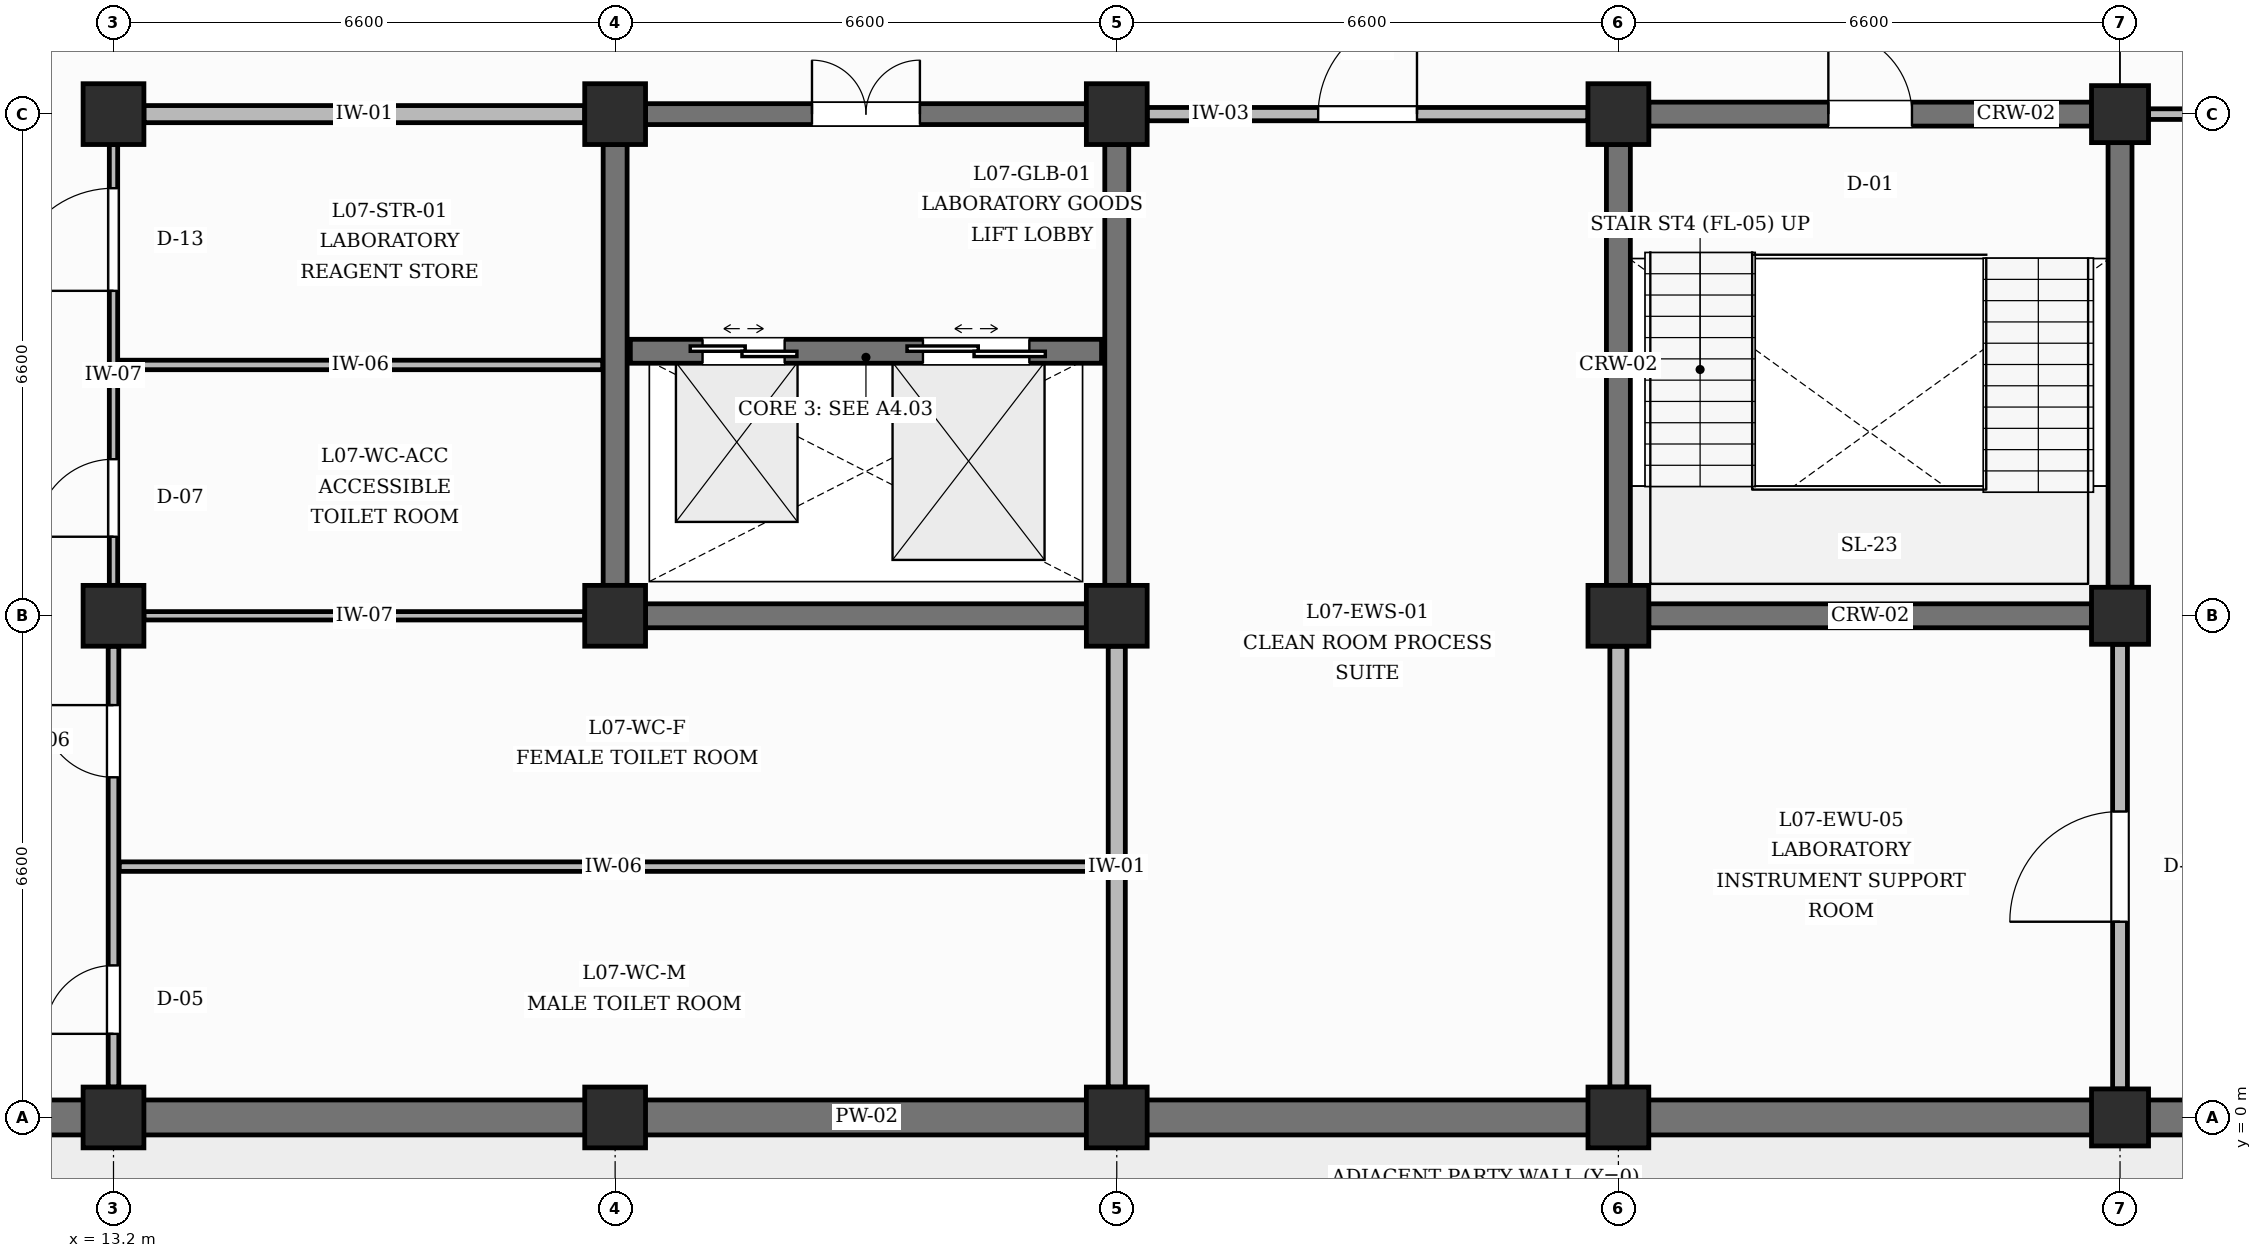
"""IFC4 building model, lengths in metres.
Left out: names, types, materials, properties, quantities, classifications, styles, units other than length and angle.
Written with IfcOpenShell. Run it as: python <this file> out.ifc"""

import sys

from ifc_helpers import new_model, si_unit, direction, frame, frame_2d, origin, origin_2d, place, context, subcontext, project, spatial, rectangle, extrude, element, fill, save


model = new_model("IFC4")
c1 = context("Model", 3, precision=1e-05, world=origin(), true_north=direction((0.0, 1.0)))
c2 = subcontext(c1, "Body", "Model", "MODEL_VIEW")
j1 = project(units=[si_unit("LENGTHUNIT", "METRE"), si_unit("PLANEANGLEUNIT", "RADIAN")], contexts=[c1])
p1 = place(None, origin())
s1 = spatial("IfcSite", under=j1, at=p1, CompositionType="ELEMENT")
p2 = place(p1, origin())
s2 = spatial("IfcBuilding", under=s1, at=p2, CompositionType="ELEMENT")
p3 = place(p2, frame((0.0, 0.0, 31.2)))
s3 = spatial("IfcBuildingStorey", under=s2, at=p3, CompositionType="ELEMENT", Elevation=31.2)
for number, where, z_axis, x_axis in (
    (1, (13.2, 0.0, 0.0), (0.0, 0.0, 1.0), (1.0, 0.0, 0.0)),
    (2, (13.2, 6.6, 0.0), (0.0, 0.0, 1.0), (1.0, 0.0, 0.0)),
    (3, (13.2, 13.2, 0.0), (0.0, 0.0, 1.0), (1.0, 0.0, 0.0)),
    (4, (19.8, 0.0, 0.0), (0.0, 0.0, 1.0), (1.0, 0.0, 0.0)),
    (5, (19.8, 6.6, 0.0), (0.0, 0.0, 1.0), (1.0, 0.0, 0.0)),
    (6, (19.8, 13.2, 0.0), (0.0, 0.0, 1.0), (1.0, 0.0, 0.0)),
    (7, (26.4, 0.0, 0.0), (0.0, 0.0, 1.0), (1.0, 0.0, 0.0)),
    (8, (26.4, 6.6, 0.0), (0.0, 0.0, 1.0), (1.0, 0.0, 0.0)),
    (9, (26.4, 13.2, 0.0), (0.0, 0.0, 1.0), (1.0, 0.0, 0.0)),
    (10, (33.0, 0.0, 0.0), (0.0, 0.0, 1.0), (1.0, 0.0, 0.0)),
    (11, (33.0, 6.6, 0.0), (0.0, 0.0, 1.0), (1.0, 0.0, 0.0)),
    (12, (33.0, 13.2, 0.0), (0.0, 0.0, 1.0), (1.0, 0.0, 0.0)),
):
    element("IfcColumn", number, at=place(p3, frame(where, z_axis=z_axis, x_axis=x_axis)), inside=s3, PredefinedType="COLUMN", context=c2, shape_type="SweptSolid", body=[
        extrude(rectangle(XDim=0.8, YDim=0.8, at=origin_2d()), origin(), (0.0, 0.0, 1.0), 4.2),
    ])
for number, where, z_axis, x_axis in (
    (13, (39.6, 0.0, 0.0), (0.0, 0.0, 1.0), (1.0, 0.0, 0.0)),
    (14, (39.6, 6.6, 0.0), (0.0, 0.0, 1.0), (1.0, 0.0, 0.0)),
    (15, (39.6, 13.2, 0.0), (0.0, 0.0, 1.0), (1.0, 0.0, 0.0)),
):
    element("IfcColumn", number, at=place(p3, frame(where, z_axis=z_axis, x_axis=x_axis)), inside=s3, PredefinedType="COLUMN", context=c2, shape_type="SweptSolid", body=[
        extrude(rectangle(XDim=0.75, YDim=0.75, at=origin_2d()), origin(), (0.0, 0.0, 1.0), 4.2),
    ])
p4 = place(p3, frame((7.0, 0.0, 0.0), z_axis=(0.0, 0.0, 1.0), x_axis=(1.0, 0.0, 0.0)))
e16 = element("IfcWall", 16, at=p4, inside=s3, PredefinedType="SOLIDWALL", context=c2, shape_type="SweptSolid", body=[
    extrude(rectangle(XDim=5.8, YDim=0.46, at=frame_2d((2.9, 0.0))), origin(), (0.0, 0.0, 1.0), 3.28),
])
p5 = place(p3, frame((13.6, 0.0, 0.0), z_axis=(0.0, 0.0, 1.0), x_axis=(1.0, 0.0, 0.0)))
e17 = element("IfcWall", 17, at=p5, inside=s3, PredefinedType="SOLIDWALL", context=c2, shape_type="SweptSolid", body=[
    extrude(rectangle(XDim=5.8, YDim=0.46, at=frame_2d((2.9, 0.0))), origin(), (0.0, 0.0, 1.0), 3.28),
])
for number, where, z_axis, x_axis in (
    (18, (20.2, 0.0, 0.0), (0.0, 0.0, 1.0), (1.0, 0.0, 0.0)),
    (19, (26.8, 0.0, 0.0), (0.0, 0.0, 1.0), (1.0, 0.0, 0.0)),
):
    element("IfcWall", number, at=place(p3, frame(where, z_axis=z_axis, x_axis=x_axis)), inside=s3, PredefinedType="SOLIDWALL", context=c2, shape_type="SweptSolid", body=[
        extrude(rectangle(XDim=5.8, YDim=0.46, at=frame_2d((2.9, 0.0))), origin(), (0.0, 0.0, 1.0), 3.28),
    ])
p6 = place(p3, frame((33.4, 0.0, 0.0), z_axis=(0.0, 0.0, 1.0), x_axis=(1.0, 0.0, 0.0)))
e20 = element("IfcWall", 20, at=p6, inside=s3, PredefinedType="SOLIDWALL", context=c2, shape_type="SweptSolid", body=[
    extrude(rectangle(XDim=5.825, YDim=0.46, at=frame_2d((2.913, 0.0))), origin(), (0.0, 0.0, 1.0), 3.28),
])
p7 = place(p3, frame((39.975, 0.0, 0.0), z_axis=(0.0, 0.0, 1.0), x_axis=(1.0, 0.0, 0.0)))
e21 = element("IfcWall", 21, at=p7, inside=s3, PredefinedType="SOLIDWALL", context=c2, shape_type="SweptSolid", body=[
    extrude(rectangle(XDim=5.85, YDim=0.46, at=frame_2d((2.925, 0.0))), origin(), (0.0, 0.0, 1.0), 3.28),
])
p8 = place(p3, frame((33.4, 6.6, 0.0), z_axis=(0.0, 0.0, 1.0), x_axis=(1.0, 0.0, 0.0)))
e22 = element("IfcWall", 22, at=p8, inside=s3, PredefinedType="SHEAR", context=c2, shape_type="SweptSolid", body=[
    extrude(rectangle(XDim=5.825, YDim=0.315, at=frame_2d((2.913, 0.0))), origin(), (0.0, 0.0, 1.0), 3.18),
])
p9 = place(p3, frame((33.4, 13.2, 0.0), z_axis=(0.0, 0.0, 1.0), x_axis=(1.0, 0.0, 0.0)))
e23 = element("IfcWall", 23, at=p9, inside=s3, PredefinedType="SHEAR", context=c2, shape_type="SweptSolid", body=[
    extrude(rectangle(XDim=5.825, YDim=0.315, at=frame_2d((2.913, 0.0))), origin(), (0.0, 0.0, 1.0), 3.18),
])
p10 = place(p9, frame((2.363, 0.0, 0.0)))
e24 = element("IfcOpeningElement", 24, at=p10, cuts=e23, PredefinedType="OPENING", context=c2, shape_type="SweptSolid", body=[
    extrude(rectangle(XDim=1.1, YDim=2.15, at=frame_2d((0.55, 1.075))), frame((0.0, 0.167, 0.0), z_axis=(0.0, -1.0, 0.0), x_axis=(1.0, 0.0, 0.0)), (0.0, 0.0, 1.0), 0.335),
])
p11 = place(p3, frame((33.0, 7.0, 0.0), z_axis=(0.0, 0.0, 1.0), x_axis=(0.0, 1.0, 0.0)))
e25 = element("IfcWall", 25, at=p11, inside=s3, PredefinedType="SHEAR", context=c2, shape_type="SweptSolid", body=[
    extrude(rectangle(XDim=5.8, YDim=0.315, at=frame_2d((2.9, 0.0))), origin(), (0.0, 0.0, 1.0), 3.18),
])
p12 = place(p3, frame((39.6, 6.975, 0.0), z_axis=(0.0, 0.0, 1.0), x_axis=(0.0, 1.0, 0.0)))
e26 = element("IfcWall", 26, at=p12, inside=s3, PredefinedType="SHEAR", context=c2, shape_type="SweptSolid", body=[
    extrude(rectangle(XDim=5.85, YDim=0.315, at=frame_2d((2.925, 0.0))), origin(), (0.0, 0.0, 1.0), 3.18),
])
for number, where, z_axis, x_axis in (
    (27, (20.2, 6.6, 0.0), (0.0, 0.0, 1.0), (1.0, 0.0, 0.0)),
    (28, (19.8, 7.0, 0.0), (0.0, 0.0, 1.0), (0.0, 1.0, 0.0)),
    (29, (26.4, 7.0, 0.0), (0.0, 0.0, 1.0), (0.0, 1.0, 0.0)),
):
    element("IfcWall", number, at=place(p3, frame(where, z_axis=z_axis, x_axis=x_axis)), inside=s3, PredefinedType="SHEAR", context=c2, shape_type="SweptSolid", body=[
        extrude(rectangle(XDim=5.8, YDim=0.315, at=frame_2d((2.9, 0.0))), origin(), (0.0, 0.0, 1.0), 3.18),
    ])
p13 = place(p3, frame((20.2, 13.2, 0.0), z_axis=(0.0, 0.0, 1.0), x_axis=(1.0, 0.0, 0.0)))
e30 = element("IfcWall", 30, at=p13, inside=s3, PredefinedType="SHEAR", context=c2, shape_type="SweptSolid", body=[
    extrude(rectangle(XDim=5.8, YDim=0.275, at=frame_2d((2.9, 0.0))), origin(), (0.0, 0.0, 1.0), 3.18),
])
p14 = place(p13, frame((2.19, 0.0, 0.0)))
e31 = element("IfcOpeningElement", 31, at=p14, cuts=e30, PredefinedType="OPENING", context=c2, shape_type="SweptSolid", body=[
    extrude(rectangle(XDim=1.42, YDim=2.2, at=frame_2d((0.71, 1.1))), frame((0.0, 0.147, 0.0), z_axis=(0.0, -1.0, 0.0), x_axis=(1.0, 0.0, 0.0)), (0.0, 0.0, 1.0), 0.295),
])
p15 = place(p3, frame((20.0, 10.08, 0.0), z_axis=(0.0, 0.0, 1.0), x_axis=(1.0, 0.0, 0.0)))
e32 = element("IfcWall", 32, at=p15, inside=s3, PredefinedType="SHEAR", context=c2, shape_type="SweptSolid", body=[
    extrude(rectangle(XDim=6.2, YDim=0.315, at=frame_2d((3.1, 0.0))), origin(), (0.0, 0.0, 1.0), 3.88),
])
p16 = place(p15, frame((0.95, 0.0, 0.0)))
e33 = element("IfcOpeningElement", 33, at=p16, cuts=e32, PredefinedType="OPENING", context=c2, shape_type="SweptSolid", body=[
    extrude(rectangle(XDim=1.08, YDim=2.15, at=frame_2d((0.54, 1.075))), frame((0.0, 0.167, 0.0), z_axis=(0.0, -1.0, 0.0), x_axis=(1.0, 0.0, 0.0)), (0.0, 0.0, 1.0), 0.335),
])
p17 = place(p15, frame((3.85, 0.0, 0.0)))
e34 = element("IfcOpeningElement", 34, at=p17, cuts=e32, PredefinedType="OPENING", context=c2, shape_type="SweptSolid", body=[
    extrude(rectangle(XDim=1.4, YDim=2.35, at=frame_2d((0.7, 1.175))), frame((0.0, 0.167, 0.0), z_axis=(0.0, -1.0, 0.0), x_axis=(1.0, 0.0, 0.0)), (0.0, 0.0, 1.0), 0.335),
])
p18 = place(p3, frame((13.2, 0.4, 0.0), z_axis=(0.0, 0.0, 1.0), x_axis=(0.0, 1.0, 0.0)))
e35 = element("IfcWall", 35, at=p18, inside=s3, PredefinedType="PARTITIONING", context=c2, shape_type="SweptSolid", body=[
    extrude(rectangle(XDim=5.8, YDim=0.14, at=frame_2d((2.9, 0.0))), origin(), (0.0, 0.0, 1.0), 3.18),
])
p19 = place(p18, frame((0.7, 0.0, 0.0)))
e36 = element("IfcOpeningElement", 36, at=p19, cuts=e35, PredefinedType="OPENING", context=c2, shape_type="SweptSolid", body=[
    extrude(rectangle(XDim=0.9, YDim=2.1, at=frame_2d((0.45, 1.05))), frame((0.0, 0.08, 0.0), z_axis=(0.0, -1.0, 0.0), x_axis=(1.0, 0.0, 0.0)), (0.0, 0.0, 1.0), 0.16),
])
p20 = place(p18, frame((4.075, 0.0, 0.0)))
e37 = element("IfcOpeningElement", 37, at=p20, cuts=e35, PredefinedType="OPENING", context=c2, shape_type="SweptSolid", body=[
    extrude(rectangle(XDim=0.95, YDim=2.1, at=frame_2d((0.475, 1.05))), frame((0.0, 0.08, 0.0), z_axis=(0.0, -1.0, 0.0), x_axis=(1.0, 0.0, 0.0)), (0.0, 0.0, 1.0), 0.16),
])
p21 = place(p3, frame((26.4, 0.4, 0.0), z_axis=(0.0, 0.0, 1.0), x_axis=(0.0, 1.0, 0.0)))
e38 = element("IfcWall", 38, at=p21, inside=s3, PredefinedType="PARTITIONING", context=c2, shape_type="SweptSolid", body=[
    extrude(rectangle(XDim=5.8, YDim=0.225, at=frame_2d((2.9, 0.0))), origin(), (0.0, 0.0, 1.0), 3.18),
])
p22 = place(p3, frame((13.6, 6.6, 0.0), z_axis=(0.0, 0.0, 1.0), x_axis=(1.0, 0.0, 0.0)))
e39 = element("IfcWall", 39, at=p22, inside=s3, PredefinedType="PARTITIONING", context=c2, shape_type="SweptSolid", body=[
    extrude(rectangle(XDim=5.8, YDim=0.11, at=frame_2d((2.9, 0.0))), origin(), (0.0, 0.0, 1.0), 3.18),
])
p23 = place(p3, frame((13.2, 7.0, 0.0), z_axis=(0.0, 0.0, 1.0), x_axis=(0.0, 1.0, 0.0)))
e40 = element("IfcWall", 40, at=p23, inside=s3, PredefinedType="PARTITIONING", context=c2, shape_type="SweptSolid", body=[
    extrude(rectangle(XDim=5.8, YDim=0.11, at=frame_2d((2.9, 0.0))), origin(), (0.0, 0.0, 1.0), 3.18),
])
p24 = place(p23, frame((0.64, 0.0, 0.0)))
e41 = element("IfcOpeningElement", 41, at=p24, cuts=e40, PredefinedType="OPENING", context=c2, shape_type="SweptSolid", body=[
    extrude(rectangle(XDim=1.02, YDim=2.15, at=frame_2d((0.51, 1.075))), frame((0.0, 0.065, 0.0), z_axis=(0.0, -1.0, 0.0), x_axis=(1.0, 0.0, 0.0)), (0.0, 0.0, 1.0), 0.13),
])
p25 = place(p23, frame((3.875, 0.0, 0.0)))
e42 = element("IfcOpeningElement", 42, at=p25, cuts=e40, PredefinedType="OPENING", context=c2, shape_type="SweptSolid", body=[
    extrude(rectangle(XDim=1.35, YDim=2.3, at=frame_2d((0.675, 1.15))), frame((0.0, 0.065, 0.0), z_axis=(0.0, -1.0, 0.0), x_axis=(1.0, 0.0, 0.0)), (0.0, 0.0, 1.0), 0.13),
])
p26 = place(p3, frame((13.6, 13.2, 0.0), z_axis=(0.0, 0.0, 1.0), x_axis=(1.0, 0.0, 0.0)))
e43 = element("IfcWall", 43, at=p26, inside=s3, PredefinedType="PARTITIONING", context=c2, shape_type="SweptSolid", body=[
    extrude(rectangle(XDim=5.8, YDim=0.225, at=frame_2d((2.9, 0.0))), origin(), (0.0, 0.0, 1.0), 3.18),
])
p27 = place(p3, frame((33.0, 0.4, 0.0), z_axis=(0.0, 0.0, 1.0), x_axis=(0.0, 1.0, 0.0)))
e44 = element("IfcWall", 44, at=p27, inside=s3, PredefinedType="PARTITIONING", context=c2, shape_type="SweptSolid", body=[
    extrude(rectangle(XDim=5.8, YDim=0.225, at=frame_2d((2.9, 0.0))), origin(), (0.0, 0.0, 1.0), 3.18),
])
p28 = place(p3, frame((26.8, 13.2, 0.0), z_axis=(0.0, 0.0, 1.0), x_axis=(1.0, 0.0, 0.0)))
e45 = element("IfcWall", 45, at=p28, inside=s3, PredefinedType="PARTITIONING", context=c2, shape_type="SweptSolid", body=[
    extrude(rectangle(XDim=5.8, YDim=0.175, at=frame_2d((2.9, 0.0))), origin(), (0.0, 0.0, 1.0), 3.18),
])
p29 = place(p28, frame((2.25, 0.0, 0.0)))
e46 = element("IfcOpeningElement", 46, at=p29, cuts=e45, PredefinedType="OPENING", context=c2, shape_type="SweptSolid", body=[
    extrude(rectangle(XDim=1.3, YDim=2.3, at=frame_2d((0.65, 1.15))), frame((0.0, 0.097, 0.0), z_axis=(0.0, -1.0, 0.0), x_axis=(1.0, 0.0, 0.0)), (0.0, 0.0, 1.0), 0.195),
])
p30 = place(p3, frame((39.6, 0.375, 0.0), z_axis=(0.0, 0.0, 1.0), x_axis=(0.0, 1.0, 0.0)))
e47 = element("IfcWall", 47, at=p30, inside=s3, PredefinedType="PARTITIONING", context=c2, shape_type="SweptSolid", body=[
    extrude(rectangle(XDim=5.85, YDim=0.195, at=frame_2d((2.925, 0.0))), origin(), (0.0, 0.0, 1.0), 3.18),
])
p31 = place(p30, frame((2.2, 0.0, 0.0)))
e48 = element("IfcOpeningElement", 48, at=p31, cuts=e47, PredefinedType="OPENING", context=c2, shape_type="SweptSolid", body=[
    extrude(rectangle(XDim=1.45, YDim=2.25, at=frame_2d((0.725, 1.125))), frame((0.0, 0.107, 0.0), z_axis=(0.0, -1.0, 0.0), x_axis=(1.0, 0.0, 0.0)), (0.0, 0.0, 1.0), 0.215),
])
p32 = place(p3, frame((39.975, 13.2, 0.0), z_axis=(0.0, 0.0, 1.0), x_axis=(1.0, 0.0, 0.0)))
e49 = element("IfcWall", 49, at=p32, inside=s3, PredefinedType="PARTITIONING", context=c2, shape_type="SweptSolid", body=[
    extrude(rectangle(XDim=5.85, YDim=0.14, at=frame_2d((2.925, 0.0))), origin(), (0.0, 0.0, 1.0), 3.18),
])
p33 = place(p32, frame((2.3, 0.0, 0.0)))
e50 = element("IfcOpeningElement", 50, at=p33, cuts=e49, PredefinedType="OPENING", context=c2, shape_type="SweptSolid", body=[
    extrude(rectangle(XDim=1.25, YDim=2.25, at=frame_2d((0.625, 1.125))), frame((0.0, 0.08, 0.0), z_axis=(0.0, -1.0, 0.0), x_axis=(1.0, 0.0, 0.0)), (0.0, 0.0, 1.0), 0.16),
])
p34 = place(p3, frame((13.275, 3.3, 0.0), z_axis=(0.0, 0.0, 1.0), x_axis=(1.0, 0.0, 0.0)))
e51 = element("IfcWall", 51, at=p34, inside=s3, PredefinedType="PARTITIONING", context=c2, shape_type="SweptSolid", body=[
    extrude(rectangle(XDim=13.008, YDim=0.125, at=frame_2d((6.504, 0.0))), origin(), (0.0, 0.0, 1.0), 3.88),
])
p35 = place(p3, frame((13.26, 9.9, 0.0), z_axis=(0.0, 0.0, 1.0), x_axis=(1.0, 0.0, 0.0)))
e52 = element("IfcWall", 52, at=p35, inside=s3, PredefinedType="PARTITIONING", context=c2, shape_type="SweptSolid", body=[
    extrude(rectangle(XDim=6.377, YDim=0.125, at=frame_2d((3.189, 0.0))), origin(), (0.0, 0.0, 1.0), 3.88),
])
p36 = place(p10, origin())
e53 = element("IfcDoor", 53, at=p36, inside=s3, OperationType="SINGLE_SWING_LEFT", PredefinedType="DOOR", context=c2, shape_type="SweptSolid", body=[
    extrude(rectangle(XDim=1.1, YDim=2.15, at=frame_2d((0.55, 1.075))), frame((0.0, 0.025, 0.0), z_axis=(0.0, -1.0, 0.0), x_axis=(1.0, 0.0, 0.0)), (0.0, 0.0, 1.0), 0.05),
])
fill(e24, e53)
p37 = place(p16, origin())
e54 = element("IfcDoor", 54, at=p37, inside=s3, OperationType="DOUBLE_DOOR_SLIDING", PredefinedType="USERDEFINED", context=c2, shape_type="SweptSolid", body=[
    extrude(rectangle(XDim=1.08, YDim=2.15, at=frame_2d((0.54, 1.075))), frame((0.0, 0.025, 0.0), z_axis=(0.0, -1.0, 0.0), x_axis=(1.0, 0.0, 0.0)), (0.0, 0.0, 1.0), 0.05),
])
fill(e33, e54)
p38 = place(p17, origin())
e55 = element("IfcDoor", 55, at=p38, inside=s3, OperationType="DOUBLE_DOOR_SLIDING", PredefinedType="USERDEFINED", context=c2, shape_type="SweptSolid", body=[
    extrude(rectangle(XDim=1.4, YDim=2.35, at=frame_2d((0.7, 1.175))), frame((0.0, 0.025, 0.0), z_axis=(0.0, -1.0, 0.0), x_axis=(1.0, 0.0, 0.0)), (0.0, 0.0, 1.0), 0.05),
])
fill(e34, e55)
p39 = place(p14, origin())
e56 = element("IfcDoor", 56, at=p39, inside=s3, OperationType="DOUBLE_DOOR_SINGLE_SWING", PredefinedType="DOOR", context=c2, shape_type="SweptSolid", body=[
    extrude(rectangle(XDim=1.42, YDim=2.2, at=frame_2d((0.71, 1.1))), frame((0.0, 0.025, 0.0), z_axis=(0.0, -1.0, 0.0), x_axis=(1.0, 0.0, 0.0)), (0.0, 0.0, 1.0), 0.05),
])
fill(e31, e56)
p40 = place(p19, origin())
e57 = element("IfcDoor", 57, at=p40, inside=s3, OperationType="SINGLE_SWING_LEFT", PredefinedType="DOOR", context=c2, shape_type="SweptSolid", body=[
    extrude(rectangle(XDim=0.9, YDim=2.1, at=frame_2d((0.45, 1.05))), frame((0.0, 0.025, 0.0), z_axis=(0.0, -1.0, 0.0), x_axis=(1.0, 0.0, 0.0)), (0.0, 0.0, 1.0), 0.05),
])
fill(e36, e57)
p41 = place(p20, origin())
e58 = element("IfcDoor", 58, at=p41, inside=s3, OperationType="SINGLE_SWING_RIGHT", PredefinedType="DOOR", context=c2, shape_type="SweptSolid", body=[
    extrude(rectangle(XDim=0.95, YDim=2.1, at=frame_2d((0.475, 1.05))), frame((0.0, 0.025, 0.0), z_axis=(0.0, -1.0, 0.0), x_axis=(1.0, 0.0, 0.0)), (0.0, 0.0, 1.0), 0.05),
])
fill(e37, e58)
p42 = place(p24, origin())
e59 = element("IfcDoor", 59, at=p42, inside=s3, OperationType="SINGLE_SWING_LEFT", PredefinedType="DOOR", context=c2, shape_type="SweptSolid", body=[
    extrude(rectangle(XDim=1.02, YDim=2.15, at=frame_2d((0.51, 1.075))), frame((0.0, 0.025, 0.0), z_axis=(0.0, -1.0, 0.0), x_axis=(1.0, 0.0, 0.0)), (0.0, 0.0, 1.0), 0.05),
])
fill(e41, e59)
p43 = place(p25, origin())
e60 = element("IfcDoor", 60, at=p43, inside=s3, OperationType="SINGLE_SWING_LEFT", PredefinedType="DOOR", context=c2, shape_type="SweptSolid", body=[
    extrude(rectangle(XDim=1.35, YDim=2.3, at=frame_2d((0.675, 1.15))), frame((0.0, 0.025, 0.0), z_axis=(0.0, -1.0, 0.0), x_axis=(1.0, 0.0, 0.0)), (0.0, 0.0, 1.0), 0.05),
])
fill(e42, e60)
p44 = place(p29, origin())
e61 = element("IfcDoor", 61, at=p44, inside=s3, OperationType="SINGLE_SWING_RIGHT", PredefinedType="DOOR", context=c2, shape_type="SweptSolid", body=[
    extrude(rectangle(XDim=1.3, YDim=2.3, at=frame_2d((0.65, 1.15))), frame((0.0, 0.025, 0.0), z_axis=(0.0, -1.0, 0.0), x_axis=(1.0, 0.0, 0.0)), (0.0, 0.0, 1.0), 0.05),
])
fill(e46, e61)
p45 = place(p31, origin())
e62 = element("IfcDoor", 62, at=p45, inside=s3, OperationType="SINGLE_SWING_LEFT", PredefinedType="DOOR", context=c2, shape_type="SweptSolid", body=[
    extrude(rectangle(XDim=1.45, YDim=2.25, at=frame_2d((0.725, 1.125))), frame((0.0, 0.025, 0.0), z_axis=(0.0, -1.0, 0.0), x_axis=(1.0, 0.0, 0.0)), (0.0, 0.0, 1.0), 0.05),
])
fill(e48, e62)
save(model, sys.argv[1])
